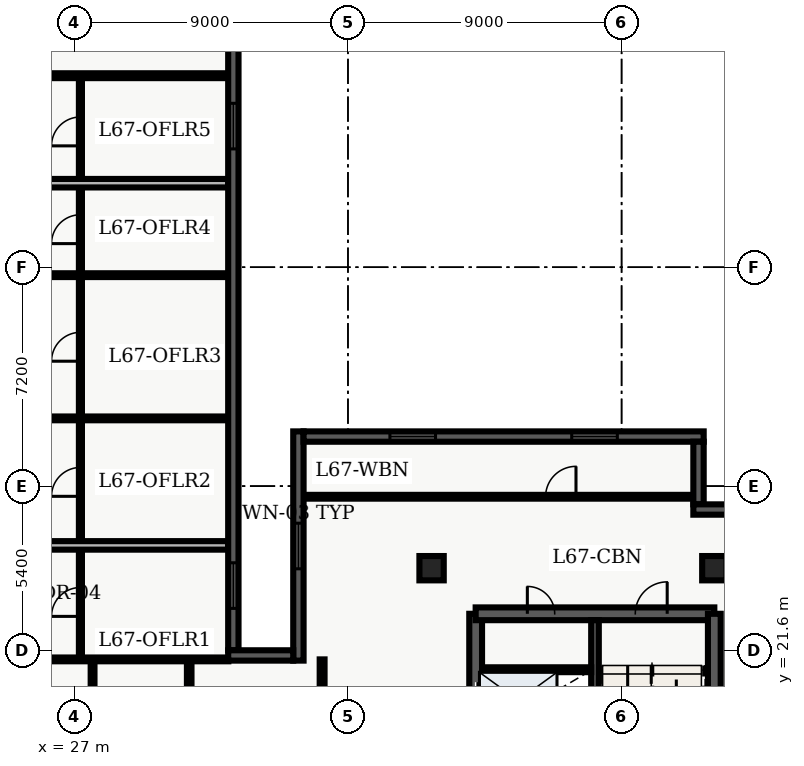
"""IFC4 building model, lengths in metres.
Left out: names, types, materials, properties, quantities, classifications, styles, units other than length and angle.
Written with IfcOpenShell. Run it as: python <this file> out.ifc"""

import sys

from ifc_helpers import new_model, entity, si_unit, converted_unit, direction, frame, origin_with_axes, origin_2d_with_axis, place, context, subcontext, project, spatial, polyline, rectangle, outline, extrude, element, fill, save


model = new_model("IFC4")
c1 = context("Model", 3, precision=1e-05, world=origin_with_axes(), true_north=direction((0.0, 1.0)))
c2 = subcontext(c1, "Body", "Model", "MODEL_VIEW")
j1 = project(units=[si_unit("LENGTHUNIT", "METRE"), converted_unit("PLANEANGLEUNIT", "DEGREE", entity("IfcPlaneAngleMeasure", 0.017), si_unit("PLANEANGLEUNIT", "RADIAN"), dimensions=[0, 0, 0, 0, 0, 0, 0])], contexts=[c1])
p1 = place(None, origin_with_axes())
s1 = spatial("IfcSite", under=j1, at=p1, CompositionType="ELEMENT")
p2 = place(p1, origin_with_axes())
s2 = spatial("IfcBuilding", under=s1, at=p2, CompositionType="ELEMENT")
p3 = place(p2, frame((0.0, 0.0, 272.4), z_axis=(0.0, 0.0, 1.0), x_axis=(1.0, 0.0, 0.0)))
s3 = spatial("IfcBuildingStorey", under=s2, at=p3, CompositionType="ELEMENT", Elevation=272.4)
p4 = place(p3, frame((40.2, 7.2, 0.0), z_axis=(0.0, 0.0, 1.0), x_axis=(0.0, 1.0, 0.0)))
e1 = element("IfcWall", 1, at=p4, inside=s3, PredefinedType="SHEAR", context=c2, shape_type="SweptSolid", body=[
    extrude(outline(polyline([(0.0, -0.21), (15.6, -0.21), (15.6, 0.21), (0.0, 0.21), (0.0, -0.21)])), origin_with_axes(), (0.0, 0.0, 1.0), 3.66),
])
p5 = place(p4, frame((12.75, 0.0, 0.0), z_axis=(0.0, 0.0, 1.0), x_axis=(1.0, 0.0, 0.0)))
e2 = element("IfcOpeningElement", 2, at=p5, cuts=e1, PredefinedType="OPENING", context=c2, shape_type="SweptSolid", body=[
    extrude(rectangle(XDim=1.2, YDim=0.44, at=origin_2d_with_axis()), origin_with_axes(), (0.0, 0.0, 1.0), 2.15),
])
p6 = place(p4, frame((9.3, 0.0, 0.0), z_axis=(0.0, 0.0, 1.0), x_axis=(1.0, 0.0, 0.0)))
e3 = element("IfcOpeningElement", 3, at=p6, cuts=e1, PredefinedType="OPENING", context=c2, shape_type="SweptSolid", body=[
    extrude(rectangle(XDim=0.9, YDim=0.44, at=origin_2d_with_axis()), origin_with_axes(), (0.0, 0.0, 1.0), 2.15),
])
p7 = place(p3, frame((40.2, 22.8, 0.0), z_axis=(0.0, 0.0, 1.0), x_axis=(1.0, 0.0, 0.0)))
e4 = element("IfcWall", 4, at=p7, inside=s3, PredefinedType="SHEAR", context=c2, shape_type="SweptSolid", body=[
    extrude(outline(polyline([(0.0, -0.21), (7.85, -0.21), (7.85, 0.21), (0.0, 0.21), (0.0, -0.21)])), origin_with_axes(), (0.0, 0.0, 1.0), 3.66),
])
p8 = place(p7, frame((5.775, 0.0, 0.0), z_axis=(0.0, 0.0, 1.0), x_axis=(1.0, 0.0, 0.0)))
e5 = element("IfcOpeningElement", 5, at=p8, cuts=e4, PredefinedType="OPENING", context=c2, shape_type="SweptSolid", body=[
    extrude(rectangle(XDim=1.05, YDim=0.44, at=origin_2d_with_axis()), origin_with_axes(), (0.0, 0.0, 1.0), 2.15),
])
p9 = place(p7, frame((2.15, 0.0, 0.0), z_axis=(0.0, 0.0, 1.0), x_axis=(1.0, 0.0, 0.0)))
e6 = element("IfcOpeningElement", 6, at=p9, cuts=e4, PredefinedType="OPENING", context=c2, shape_type="SweptSolid", body=[
    extrude(rectangle(XDim=0.9, YDim=0.44, at=origin_2d_with_axis()), origin_with_axes(), (0.0, 0.0, 1.0), 2.15),
])
p10 = place(p3, frame((48.05, 7.2, 0.0), z_axis=(0.0, 0.0, 1.0), x_axis=(0.0, 1.0, 0.0)))
e7 = element("IfcWall", 7, at=p10, inside=s3, PredefinedType="SHEAR", context=c2, shape_type="SweptSolid", body=[
    extrude(outline(polyline([(0.0, -0.21), (15.6, -0.21), (15.6, 0.21), (0.0, 0.21), (0.0, -0.21)])), origin_with_axes(), (0.0, 0.0, 1.0), 3.66),
])
p11 = place(p10, frame((1.375, 0.0, 0.0), z_axis=(0.0, 0.0, 1.0), x_axis=(1.0, 0.0, 0.0)))
e8 = element("IfcOpeningElement", 8, at=p11, cuts=e7, PredefinedType="OPENING", context=c2, shape_type="SweptSolid", body=[
    extrude(rectangle(XDim=1.05, YDim=0.44, at=origin_2d_with_axis()), origin_with_axes(), (0.0, 0.0, 1.0), 2.15),
])
p12 = place(p10, frame((5.125, 0.0, 0.0), z_axis=(0.0, 0.0, 1.0), x_axis=(1.0, 0.0, 0.0)))
e9 = element("IfcOpeningElement", 9, at=p12, cuts=e7, PredefinedType="OPENING", context=c2, shape_type="SweptSolid", body=[
    extrude(rectangle(XDim=0.95, YDim=0.44, at=origin_2d_with_axis()), origin_with_axes(), (0.0, 0.0, 1.0), 2.15),
])
p13 = place(p3, frame((44.125, 7.41, 0.0), z_axis=(0.0, 0.0, 1.0), x_axis=(0.0, 1.0, 0.0)))
e10 = element("IfcWall", 10, at=p13, inside=s3, PredefinedType="SHEAR", context=c2, shape_type="SweptSolid", body=[
    extrude(outline(polyline([(0.0, -0.125), (15.18, -0.125), (15.18, 0.125), (0.0, 0.125), (0.0, -0.125)])), origin_with_axes(), (0.0, 0.0, 1.0), 3.66),
])
for number, where, z_axis, x_axis in (
    (11, (38.75, 24.3, 0.0), (0.0, 0.0, 1.0), (1.0, 0.0, 0.0)),
    (12, (48.05, 24.3, 0.0), (0.0, 0.0, 1.0), (1.0, 0.0, 0.0)),
):
    element("IfcColumn", number, at=place(p3, frame(where, z_axis=z_axis, x_axis=x_axis)), inside=s3, PredefinedType="COLUMN", context=c2, shape_type="SweptSolid", body=[
        extrude(rectangle(XDim=0.8, YDim=0.8, at=origin_2d_with_axis()), origin_with_axes(), (0.0, 0.0, 1.0), 3.9),
    ])
p14 = place(p3, frame((40.5, 20.96, 0.0), z_axis=(0.0, 0.0, 1.0), x_axis=(1.0, 0.0, 0.0)))
e13 = element("IfcWall", 13, at=p14, inside=s3, PredefinedType="PARTITIONING", context=c2, shape_type="SweptSolid", body=[
    extrude(outline(polyline([(0.0, -0.08), (3.5, -0.08), (3.5, 0.08), (0.0, 0.08), (0.0, -0.08)])), origin_with_axes(), (0.0, 0.0, 1.0), 2.7),
])
p15 = place(p3, frame((8.135, 40.5, 0.0), z_axis=(0.0, 0.0, 1.0), x_axis=(1.0, 0.0, 0.0)))
e14 = element("IfcWall", 14, at=p15, inside=s3, PredefinedType="PARTITIONING", context=c2, shape_type="SweptSolid", body=[
    extrude(outline(polyline([(0.0, -0.08), (23.93, -0.08), (23.93, 0.08), (0.0, 0.08), (0.0, -0.08)])), origin_with_axes(), (0.0, 0.0, 1.0), 2.7),
])
p16 = place(p15, frame((0.76, 0.0, 0.0), z_axis=(0.0, 0.0, 1.0), x_axis=(1.0, 0.0, 0.0)))
e15 = element("IfcOpeningElement", 15, at=p16, cuts=e14, PredefinedType="OPENING", context=c2, shape_type="SweptSolid", body=[
    extrude(rectangle(XDim=1.0, YDim=0.18, at=origin_2d_with_axis()), origin_with_axes(), (0.0, 0.0, 1.0), 2.15),
])
p17 = place(p15, frame((4.729, 0.0, 0.0), z_axis=(0.0, 0.0, 1.0), x_axis=(1.0, 0.0, 0.0)))
e16 = element("IfcOpeningElement", 16, at=p17, cuts=e14, PredefinedType="OPENING", context=c2, shape_type="SweptSolid", body=[
    extrude(rectangle(XDim=1.0, YDim=0.18, at=origin_2d_with_axis()), origin_with_axes(), (0.0, 0.0, 1.0), 2.15),
])
p18 = place(p15, frame((7.574, 0.0, 0.0), z_axis=(0.0, 0.0, 1.0), x_axis=(1.0, 0.0, 0.0)))
e17 = element("IfcOpeningElement", 17, at=p18, cuts=e14, PredefinedType="OPENING", context=c2, shape_type="SweptSolid", body=[
    extrude(rectangle(XDim=1.0, YDim=0.18, at=origin_2d_with_axis()), origin_with_axes(), (0.0, 0.0, 1.0), 2.15),
])
p19 = place(p15, frame((10.189, 0.0, 0.0), z_axis=(0.0, 0.0, 1.0), x_axis=(1.0, 0.0, 0.0)))
e18 = element("IfcOpeningElement", 18, at=p19, cuts=e14, PredefinedType="OPENING", context=c2, shape_type="SweptSolid", body=[
    extrude(rectangle(XDim=1.0, YDim=0.18, at=origin_2d_with_axis()), origin_with_axes(), (0.0, 0.0, 1.0), 2.15),
])
p20 = place(p3, frame((27.2, 21.4, 0.0), z_axis=(0.0, 0.0, 1.0), x_axis=(0.0, 1.0, 0.0)))
e19 = element("IfcWall", 19, at=p20, inside=s3, PredefinedType="PARTITIONING", context=c2, shape_type="SweptSolid", body=[
    extrude(outline(polyline([(0.0, -0.05), (18.9, -0.05), (18.9, 0.05), (0.0, 0.05), (0.0, -0.05)])), origin_with_axes(), (0.0, 0.0, 1.0), 2.7),
])
p21 = place(p20, frame((1.79, 0.0, 0.0), z_axis=(0.0, 0.0, 1.0), x_axis=(1.0, 0.0, 0.0)))
e20 = element("IfcOpeningElement", 20, at=p21, cuts=e19, PredefinedType="OPENING", context=c2, shape_type="SweptSolid", body=[
    extrude(rectangle(XDim=0.95, YDim=0.12, at=origin_2d_with_axis()), origin_with_axes(), (0.0, 0.0, 1.0), 2.15),
])
p22 = place(p20, frame((5.739, 0.0, 0.0), z_axis=(0.0, 0.0, 1.0), x_axis=(1.0, 0.0, 0.0)))
e21 = element("IfcOpeningElement", 21, at=p22, cuts=e19, PredefinedType="OPENING", context=c2, shape_type="SweptSolid", body=[
    extrude(rectangle(XDim=0.95, YDim=0.12, at=origin_2d_with_axis()), origin_with_axes(), (0.0, 0.0, 1.0), 2.15),
])
p23 = place(p20, frame((10.184, 0.0, 0.0), z_axis=(0.0, 0.0, 1.0), x_axis=(1.0, 0.0, 0.0)))
e22 = element("IfcOpeningElement", 22, at=p23, cuts=e19, PredefinedType="OPENING", context=c2, shape_type="SweptSolid", body=[
    extrude(rectangle(XDim=0.95, YDim=0.12, at=origin_2d_with_axis()), origin_with_axes(), (0.0, 0.0, 1.0), 2.15),
])
p24 = place(p20, frame((14.052, 0.0, 0.0), z_axis=(0.0, 0.0, 1.0), x_axis=(1.0, 0.0, 0.0)))
e23 = element("IfcOpeningElement", 23, at=p24, cuts=e19, PredefinedType="OPENING", context=c2, shape_type="SweptSolid", body=[
    extrude(rectangle(XDim=0.95, YDim=0.12, at=origin_2d_with_axis()), origin_with_axes(), (0.0, 0.0, 1.0), 2.15),
])
p25 = place(p20, frame((17.267, 0.0, 0.0), z_axis=(0.0, 0.0, 1.0), x_axis=(1.0, 0.0, 0.0)))
e24 = element("IfcOpeningElement", 24, at=p25, cuts=e19, PredefinedType="OPENING", context=c2, shape_type="SweptSolid", body=[
    extrude(rectangle(XDim=0.95, YDim=0.12, at=origin_2d_with_axis()), origin_with_axes(), (0.0, 0.0, 1.0), 2.15),
])
p26 = place(p3, frame((20.45, 25.05, 0.0), z_axis=(0.0, 0.0, 1.0), x_axis=(1.0, 0.0, 0.0)))
e25 = element("IfcWall", 25, at=p26, inside=s3, PredefinedType="PARTITIONING", context=c2, shape_type="SweptSolid", body=[
    extrude(outline(polyline([(0.0, -0.14), (11.615, -0.14), (11.615, 0.14), (0.0, 0.14), (0.0, -0.14)])), origin_with_axes(), (0.0, 0.0, 1.0), 2.7),
])
for number, where, z_axis, x_axis in (
    (26, (20.45, 29.228, 0.0), (0.0, 0.0, 1.0), (1.0, 0.0, 0.0)),
    (27, (20.45, 33.939, 0.0), (0.0, 0.0, 1.0), (1.0, 0.0, 0.0)),
):
    element("IfcWall", number, at=place(p3, frame(where, z_axis=z_axis, x_axis=x_axis)), inside=s3, PredefinedType="PARTITIONING", context=c2, shape_type="SweptSolid", body=[
        extrude(outline(polyline([(0.0, -0.062), (11.615, -0.062), (11.615, 0.062), (0.0, 0.062), (0.0, -0.062)])), origin_with_axes(), (0.0, 0.0, 1.0), 2.7),
    ])
p27 = place(p3, frame((20.45, 36.964, 0.0), z_axis=(0.0, 0.0, 1.0), x_axis=(1.0, 0.0, 0.0)))
e28 = element("IfcWall", 28, at=p27, inside=s3, PredefinedType="PARTITIONING", context=c2, shape_type="SweptSolid", body=[
    extrude(outline(polyline([(0.0, -0.14), (11.615, -0.14), (11.615, 0.14), (0.0, 0.14), (0.0, -0.14)])), origin_with_axes(), (0.0, 0.0, 1.0), 2.7),
])
p28 = place(p27, frame((3.375, 0.0, 0.0), z_axis=(0.0, 0.0, 1.0), x_axis=(1.0, 0.0, 0.0)))
e29 = element("IfcOpeningElement", 29, at=p28, cuts=e28, PredefinedType="OPENING", context=c2, shape_type="SweptSolid", body=[
    extrude(rectangle(XDim=0.95, YDim=0.3, at=origin_2d_with_axis()), origin_with_axes(), (0.0, 0.0, 1.0), 2.15),
])
p29 = place(p3, frame((35.15, 4.35, 0.0), z_axis=(0.0, 0.0, 1.0), x_axis=(0.0, 1.0, 0.0)))
e30 = element("IfcWall", 30, at=p29, inside=s3, PredefinedType="PARTITIONING", context=c2, shape_type="SweptSolid", body=[
    extrude(outline(polyline([(0.0, -0.08), (16.95, -0.08), (16.95, 0.08), (0.0, 0.08), (0.0, -0.08)])), origin_with_axes(), (0.0, 0.0, 1.0), 2.7),
])
p30 = place(p3, frame((27.6, 14.62, 0.0), z_axis=(0.0, 0.0, 1.0), x_axis=(0.0, 1.0, 0.0)))
e31 = element("IfcWall", 31, at=p30, inside=s3, PredefinedType="PARTITIONING", context=c2, shape_type="SweptSolid", body=[
    extrude(outline(polyline([(0.0, -0.062), (6.6, -0.062), (6.6, 0.062), (0.0, 0.062), (0.0, -0.062)])), origin_with_axes(), (0.0, 0.0, 1.0), 2.7),
])
p31 = place(p3, frame((30.778, 14.62, 0.0), z_axis=(0.0, 0.0, 1.0), x_axis=(0.0, 1.0, 0.0)))
e32 = element("IfcWall", 32, at=p31, inside=s3, PredefinedType="PARTITIONING", context=c2, shape_type="SweptSolid", body=[
    extrude(outline(polyline([(0.0, -0.075), (6.6, -0.075), (6.6, 0.075), (0.0, 0.075), (0.0, -0.075)])), origin_with_axes(), (0.0, 0.0, 1.0), 2.7),
])
p32 = place(p3, frame((34.535, 26.65, 0.0), z_axis=(0.0, 0.0, 1.0), x_axis=(1.0, 0.0, 0.0)))
e33 = element("IfcWall", 33, at=p32, inside=s3, PredefinedType="PARTITIONING", context=c2, shape_type="SweptSolid", body=[
    extrude(outline(polyline([(0.0, -0.062), (12.995, -0.062), (12.995, 0.062), (0.0, 0.062), (0.0, -0.062)])), origin_with_axes(), (0.0, 0.0, 1.0), 2.7),
])
p33 = place(p32, frame((8.465, 0.0, 0.0), z_axis=(0.0, 0.0, 1.0), x_axis=(1.0, 0.0, 0.0)))
e34 = element("IfcOpeningElement", 34, at=p33, cuts=e33, PredefinedType="OPENING", context=c2, shape_type="SweptSolid", body=[
    extrude(rectangle(XDim=1.0, YDim=0.145, at=origin_2d_with_axis()), origin_with_axes(), (0.0, 0.0, 1.0), 2.15),
])
p34 = place(p3, frame((20.3, 21.3, 0.0), z_axis=(0.0, 0.0, 1.0), x_axis=(1.0, 0.0, 0.0)))
e35 = element("IfcWall", 35, at=p34, inside=s3, PredefinedType="PARTITIONING", context=c2, shape_type="SweptSolid", body=[
    extrude(outline(polyline([(0.0, -0.062), (11.765, -0.062), (11.765, 0.062), (0.0, 0.062), (0.0, -0.062)])), origin_with_axes(), (0.0, 0.0, 1.0), 2.7),
])
p35 = place(p3, frame((34.37, 21.26, 0.0), z_axis=(0.0, 0.0, 1.0), x_axis=(0.0, 1.0, 0.0)))
e36 = element("IfcWall", 36, at=p35, inside=s3, PredefinedType="SOLIDWALL", context=c2, shape_type="SweptSolid", body=[
    extrude(outline(polyline([(0.0, -0.17), (7.54, -0.17), (7.54, 0.17), (0.0, 0.17), (0.0, -0.17)])), origin_with_axes(), (0.0, 0.0, 1.0), 3.66),
])
p36 = place(p35, frame((3.77, 0.0, 0.45), z_axis=(0.0, 0.0, 1.0), x_axis=(1.0, 0.0, 0.0)))
e37 = element("IfcOpeningElement", 37, at=p36, cuts=e36, PredefinedType="OPENING", context=c2, shape_type="SweptSolid", body=[
    extrude(rectangle(XDim=1.5, YDim=0.36, at=origin_2d_with_axis()), origin_with_axes(), (0.0, 0.0, 1.0), 2.1),
])
p37 = place(p3, frame((34.54, 28.63, 0.0), z_axis=(0.0, 0.0, 1.0), x_axis=(1.0, 0.0, 0.0)))
e38 = element("IfcWall", 38, at=p37, inside=s3, PredefinedType="SOLIDWALL", context=c2, shape_type="SweptSolid", body=[
    extrude(outline(polyline([(0.0, -0.17), (13.16, -0.17), (13.16, 0.17), (0.0, 0.17), (0.0, -0.17)])), origin_with_axes(), (0.0, 0.0, 1.0), 3.66),
])
p38 = place(p37, frame((3.59, 0.0, 0.45), z_axis=(0.0, 0.0, 1.0), x_axis=(1.0, 0.0, 0.0)))
e39 = element("IfcOpeningElement", 39, at=p38, cuts=e38, PredefinedType="OPENING", context=c2, shape_type="SweptSolid", body=[
    extrude(rectangle(XDim=1.5, YDim=0.36, at=origin_2d_with_axis()), origin_with_axes(), (0.0, 0.0, 1.0), 2.1),
])
p39 = place(p37, frame((9.57, 0.0, 0.45), z_axis=(0.0, 0.0, 1.0), x_axis=(1.0, 0.0, 0.0)))
e40 = element("IfcOpeningElement", 40, at=p39, cuts=e38, PredefinedType="OPENING", context=c2, shape_type="SweptSolid", body=[
    extrude(rectangle(XDim=1.5, YDim=0.36, at=origin_2d_with_axis()), origin_with_axes(), (0.0, 0.0, 1.0), 2.1),
])
p40 = place(p3, frame((47.53, 28.46, 0.0), z_axis=(0.0, 0.0, 1.0), x_axis=(0.0, -1.0, 0.0)))
e41 = element("IfcWall", 41, at=p40, inside=s3, PredefinedType="SOLIDWALL", context=c2, shape_type="SweptSolid", body=[
    extrude(outline(polyline([(0.0, -0.17), (2.06, -0.17), (2.06, 0.17), (0.0, 0.17), (0.0, -0.17)])), origin_with_axes(), (0.0, 0.0, 1.0), 3.66),
])
p41 = place(p3, frame((47.36, 26.23, 0.0), z_axis=(0.0, 0.0, 1.0), x_axis=(1.0, 0.0, 0.0)))
e42 = element("IfcWall", 42, at=p41, inside=s3, PredefinedType="SOLIDWALL", context=c2, shape_type="SweptSolid", body=[
    extrude(outline(polyline([(0.0, -0.17), (2.74, -0.17), (2.74, 0.17), (0.0, 0.17), (0.0, -0.17)])), origin_with_axes(), (0.0, 0.0, 1.0), 3.66),
])
p42 = place(p3, frame((32.23, 41.82, 0.0), z_axis=(0.0, 0.0, 1.0), x_axis=(0.0, -1.0, 0.0)))
e43 = element("IfcWall", 43, at=p42, inside=s3, PredefinedType="SOLIDWALL", context=c2, shape_type="SweptSolid", body=[
    extrude(outline(polyline([(0.0, -0.17), (20.22, -0.17), (20.22, 0.17), (0.0, 0.17), (0.0, -0.17)])), origin_with_axes(), (0.0, 0.0, 1.0), 3.66),
])
p43 = place(p42, frame((2.978, 0.0, 0.45), z_axis=(0.0, 0.0, 1.0), x_axis=(1.0, 0.0, 0.0)))
e44 = element("IfcOpeningElement", 44, at=p43, cuts=e43, PredefinedType="OPENING", context=c2, shape_type="SweptSolid", body=[
    extrude(rectangle(XDim=1.5, YDim=0.36, at=origin_2d_with_axis()), origin_with_axes(), (0.0, 0.0, 1.0), 2.1),
])
p44 = place(p42, frame((18.092, 0.0, 0.45), z_axis=(0.0, 0.0, 1.0), x_axis=(1.0, 0.0, 0.0)))
e45 = element("IfcOpeningElement", 45, at=p44, cuts=e43, PredefinedType="OPENING", context=c2, shape_type="SweptSolid", body=[
    extrude(rectangle(XDim=1.5, YDim=0.36, at=origin_2d_with_axis()), origin_with_axes(), (0.0, 0.0, 1.0), 2.1),
])
p45 = place(p3, frame((32.06, 21.43, 0.0), z_axis=(0.0, 0.0, 1.0), x_axis=(1.0, 0.0, 0.0)))
e46 = element("IfcWall", 46, at=p45, inside=s3, PredefinedType="SOLIDWALL", context=c2, shape_type="SweptSolid", body=[
    extrude(outline(polyline([(0.0, -0.17), (2.14, -0.17), (2.14, 0.17), (0.0, 0.17), (0.0, -0.17)])), origin_with_axes(), (0.0, 0.0, 1.0), 3.66),
])
p46 = place(p4, frame((12.75, 0.0, 0.0), z_axis=(0.0, 0.0, 1.0), x_axis=(1.0, 0.0, 0.0)))
e47 = element("IfcDoor", 47, at=p46, inside=s3, OperationType="DOUBLE_DOOR_SLIDING", PredefinedType="DOOR", context=c2, shape_type="SweptSolid", body=[
    extrude(rectangle(XDim=1.2, YDim=0.09, at=origin_2d_with_axis()), origin_with_axes(), (0.0, 0.0, 1.0), 2.15),
])
fill(e2, e47)
p47 = place(p7, frame((5.775, 0.0, 0.0), z_axis=(0.0, 0.0, 1.0), x_axis=(1.0, 0.0, 0.0)))
e48 = element("IfcDoor", 48, at=p47, inside=s3, OperationType="SINGLE_SWING_RIGHT", PredefinedType="DOOR", context=c2, shape_type="SweptSolid", body=[
    extrude(rectangle(XDim=1.05, YDim=0.09, at=origin_2d_with_axis()), origin_with_axes(), (0.0, 0.0, 1.0), 2.15),
])
fill(e5, e48)
p48 = place(p7, frame((2.15, 0.0, 0.0), z_axis=(0.0, 0.0, 1.0), x_axis=(1.0, 0.0, 0.0)))
e49 = element("IfcDoor", 49, at=p48, inside=s3, OperationType="SINGLE_SWING_LEFT", PredefinedType="DOOR", context=c2, shape_type="SweptSolid", body=[
    extrude(rectangle(XDim=0.9, YDim=0.09, at=origin_2d_with_axis()), origin_with_axes(), (0.0, 0.0, 1.0), 2.15),
])
fill(e6, e49)
p49 = place(p20, frame((1.79, 0.0, 0.0), z_axis=(0.0, 0.0, 1.0), x_axis=(1.0, 0.0, 0.0)))
e50 = element("IfcDoor", 50, at=p49, inside=s3, OperationType="SINGLE_SWING_LEFT", PredefinedType="DOOR", context=c2, shape_type="SweptSolid", body=[
    extrude(rectangle(XDim=0.95, YDim=0.06, at=origin_2d_with_axis()), origin_with_axes(), (0.0, 0.0, 1.0), 2.15),
])
fill(e20, e50)
p50 = place(p20, frame((5.739, 0.0, 0.0), z_axis=(0.0, 0.0, 1.0), x_axis=(1.0, 0.0, 0.0)))
e51 = element("IfcDoor", 51, at=p50, inside=s3, OperationType="SINGLE_SWING_LEFT", PredefinedType="DOOR", context=c2, shape_type="SweptSolid", body=[
    extrude(rectangle(XDim=0.95, YDim=0.06, at=origin_2d_with_axis()), origin_with_axes(), (0.0, 0.0, 1.0), 2.15),
])
fill(e21, e51)
p51 = place(p20, frame((10.184, 0.0, 0.0), z_axis=(0.0, 0.0, 1.0), x_axis=(1.0, 0.0, 0.0)))
e52 = element("IfcDoor", 52, at=p51, inside=s3, OperationType="SINGLE_SWING_LEFT", PredefinedType="DOOR", context=c2, shape_type="SweptSolid", body=[
    extrude(rectangle(XDim=0.95, YDim=0.06, at=origin_2d_with_axis()), origin_with_axes(), (0.0, 0.0, 1.0), 2.15),
])
fill(e22, e52)
p52 = place(p20, frame((14.052, 0.0, 0.0), z_axis=(0.0, 0.0, 1.0), x_axis=(1.0, 0.0, 0.0)))
e53 = element("IfcDoor", 53, at=p52, inside=s3, OperationType="SINGLE_SWING_LEFT", PredefinedType="DOOR", context=c2, shape_type="SweptSolid", body=[
    extrude(rectangle(XDim=0.95, YDim=0.06, at=origin_2d_with_axis()), origin_with_axes(), (0.0, 0.0, 1.0), 2.15),
])
fill(e23, e53)
p53 = place(p20, frame((17.267, 0.0, 0.0), z_axis=(0.0, 0.0, 1.0), x_axis=(1.0, 0.0, 0.0)))
e54 = element("IfcDoor", 54, at=p53, inside=s3, OperationType="SINGLE_SWING_LEFT", PredefinedType="DOOR", context=c2, shape_type="SweptSolid", body=[
    extrude(rectangle(XDim=0.95, YDim=0.06, at=origin_2d_with_axis()), origin_with_axes(), (0.0, 0.0, 1.0), 2.15),
])
fill(e24, e54)
p54 = place(p32, frame((8.465, 0.0, 0.0), z_axis=(0.0, 0.0, 1.0), x_axis=(1.0, 0.0, 0.0)))
e55 = element("IfcDoor", 55, at=p54, inside=s3, OperationType="SINGLE_SWING_RIGHT", PredefinedType="DOOR", context=c2, shape_type="SweptSolid", body=[
    extrude(rectangle(XDim=1.0, YDim=0.075, at=origin_2d_with_axis()), origin_with_axes(), (0.0, 0.0, 1.0), 2.15),
])
fill(e34, e55)
p55 = place(p35, frame((3.77, 0.0, 0.45), z_axis=(0.0, 0.0, 1.0), x_axis=(1.0, 0.0, 0.0)))
e56 = element("IfcWindow", 56, at=p55, inside=s3, PredefinedType="WINDOW", context=c2, shape_type="SweptSolid", body=[
    extrude(rectangle(XDim=1.5, YDim=0.09, at=origin_2d_with_axis()), origin_with_axes(), (0.0, 0.0, 1.0), 2.1),
])
fill(e37, e56)
p56 = place(p37, frame((3.59, 0.0, 0.45), z_axis=(0.0, 0.0, 1.0), x_axis=(1.0, 0.0, 0.0)))
e57 = element("IfcWindow", 57, at=p56, inside=s3, PredefinedType="WINDOW", context=c2, shape_type="SweptSolid", body=[
    extrude(rectangle(XDim=1.5, YDim=0.09, at=origin_2d_with_axis()), origin_with_axes(), (0.0, 0.0, 1.0), 2.1),
])
fill(e39, e57)
p57 = place(p37, frame((9.57, 0.0, 0.45), z_axis=(0.0, 0.0, 1.0), x_axis=(1.0, 0.0, 0.0)))
e58 = element("IfcWindow", 58, at=p57, inside=s3, PredefinedType="WINDOW", context=c2, shape_type="SweptSolid", body=[
    extrude(rectangle(XDim=1.5, YDim=0.09, at=origin_2d_with_axis()), origin_with_axes(), (0.0, 0.0, 1.0), 2.1),
])
fill(e40, e58)
p58 = place(p42, frame((2.978, 0.0, 0.45), z_axis=(0.0, 0.0, 1.0), x_axis=(1.0, 0.0, 0.0)))
e59 = element("IfcWindow", 59, at=p58, inside=s3, PredefinedType="WINDOW", context=c2, shape_type="SweptSolid", body=[
    extrude(rectangle(XDim=1.5, YDim=0.09, at=origin_2d_with_axis()), origin_with_axes(), (0.0, 0.0, 1.0), 2.1),
])
fill(e44, e59)
p59 = place(p42, frame((18.092, 0.0, 0.45), z_axis=(0.0, 0.0, 1.0), x_axis=(1.0, 0.0, 0.0)))
e60 = element("IfcWindow", 60, at=p59, inside=s3, PredefinedType="WINDOW", context=c2, shape_type="SweptSolid", body=[
    extrude(rectangle(XDim=1.5, YDim=0.09, at=origin_2d_with_axis()), origin_with_axes(), (0.0, 0.0, 1.0), 2.1),
])
fill(e45, e60)
save(model, sys.argv[1])
